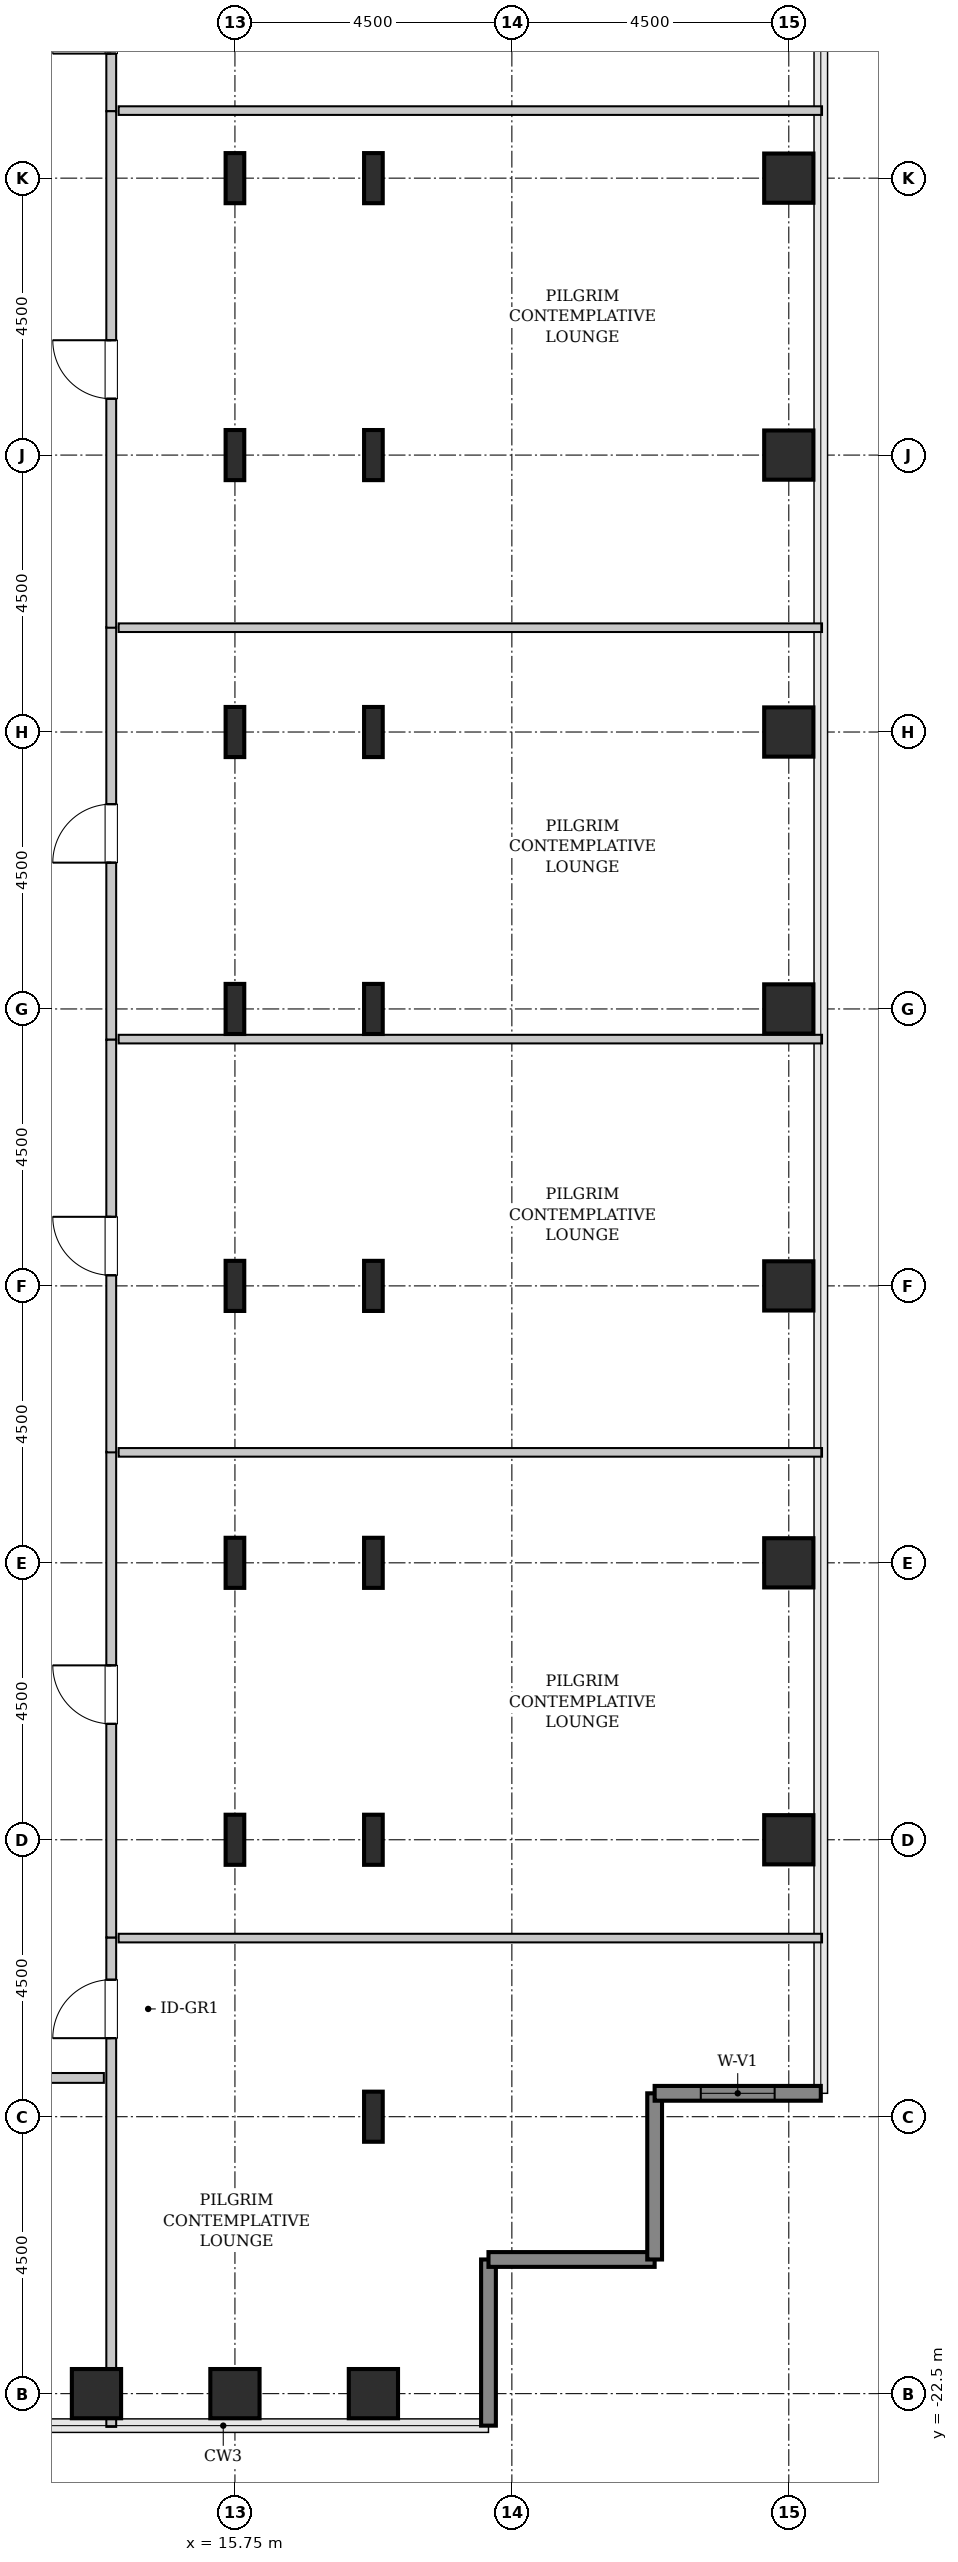
"""IFC4 building model, lengths in metres.
Left out: names, types, materials, properties, quantities, classifications, styles, units other than length and angle.
Written with IfcOpenShell. Run it as: python <this file> out.ifc"""

import sys

from ifc_helpers import new_model, si_unit, direction, frame, frame_2d, origin, origin_2d, place, context, subcontext, project, spatial, rectangle, hollow_rectangle, i_section, extrude, source, transform, mapped, element, fill, save


model = new_model("IFC4")
c1 = context("Model", 3, precision=1e-05, world=origin(), true_north=direction((0.0, 1.0)))
c2 = subcontext(c1, "Body", "Model", "MODEL_VIEW")
j1 = project(units=[si_unit("LENGTHUNIT", "METRE"), si_unit("PLANEANGLEUNIT", "RADIAN")], contexts=[c1])
p1 = place(None, origin())
s1 = spatial("IfcSite", under=j1, at=p1, CompositionType="ELEMENT")
p2 = place(p1, origin())
s2 = spatial("IfcBuilding", under=s1, at=p2, CompositionType="ELEMENT")
p3 = place(p2, frame((0.0, 0.0, 164.0)))
s3 = spatial("IfcBuildingStorey", under=s2, at=p3, CompositionType="ELEMENT", Elevation=164.0)
m1 = source(origin(), c2, "Body", "SweptSolid", [
    extrude(hollow_rectangle(XDim=0.8, YDim=0.8, WallThickness=0.04, InnerFilletRadius=0.04, OuterFilletRadius=0.08, at=origin_2d()), origin(), (0.0, 0.0, 1.0), 3.8),
])
for number, where, z_axis, x_axis in (
    (1, (13.5, -22.5, 0.0), (0.0, 0.0, 1.0), (1.0, 0.0, 0.0)),
    (2, (15.75, -22.5, 0.0), (0.0, 0.0, 1.0), (1.0, 0.0, 0.0)),
):
    element("IfcColumn", number, at=place(p3, frame(where, z_axis=z_axis, x_axis=x_axis)), inside=s3, PredefinedType="COLUMN", context=c2, shape_type="MappedRepresentation", body=[
        mapped(m1, transform((0.0, 0.0, 0.0), x_axis=(1.0, 0.0, 0.0), y_axis=(0.0, 1.0, 0.0), z_axis=(0.0, 0.0, 1.0), scale=1.0)),
    ])
m2 = source(origin(), c2, "Body", "SweptSolid", [
    extrude(i_section(OverallWidth=0.303, OverallDepth=0.814, WebThickness=0.021, FlangeThickness=0.04, FilletRadius=0.03, at=origin_2d()), origin(), (0.0, 0.0, 1.0), 3.8),
])
for number, where, z_axis, x_axis in (
    (3, (15.75, -13.5, 0.0), (0.0, 0.0, 1.0), (1.0, 0.0, 0.0)),
    (4, (15.75, -9.0, 0.0), (0.0, 0.0, 1.0), (1.0, 0.0, 0.0)),
    (5, (15.75, -4.5, 0.0), (0.0, 0.0, 1.0), (1.0, 0.0, 0.0)),
    (6, (15.75, 0.0, 0.0), (0.0, 0.0, 1.0), (1.0, 0.0, 0.0)),
    (7, (15.75, 4.5, 0.0), (0.0, 0.0, 1.0), (1.0, 0.0, 0.0)),
    (8, (15.75, 9.0, 0.0), (0.0, 0.0, 1.0), (1.0, 0.0, 0.0)),
    (9, (15.75, 13.5, 0.0), (0.0, 0.0, 1.0), (1.0, 0.0, 0.0)),
):
    element("IfcColumn", number, at=place(p3, frame(where, z_axis=z_axis, x_axis=x_axis)), inside=s3, PredefinedType="COLUMN", context=c2, shape_type="MappedRepresentation", body=[
        mapped(m2, transform((0.0, 0.0, 0.0), x_axis=(1.0, 0.0, 0.0), y_axis=(0.0, 1.0, 0.0), z_axis=(0.0, 0.0, 1.0), scale=1.0)),
    ])
p4 = place(p3, frame((18.0, -22.5, 0.0), z_axis=(0.0, 0.0, 1.0), x_axis=(1.0, 0.0, 0.0)))
e10 = element("IfcColumn", 10, at=p4, inside=s3, PredefinedType="COLUMN", context=c2, shape_type="MappedRepresentation", body=[
    mapped(m1, transform((0.0, 0.0, 0.0), x_axis=(1.0, 0.0, 0.0), y_axis=(0.0, 1.0, 0.0), z_axis=(0.0, 0.0, 1.0), scale=1.0)),
])
for number, where, z_axis, x_axis in (
    (11, (18.0, -18.0, 0.0), (0.0, 0.0, 1.0), (1.0, 0.0, 0.0)),
    (12, (18.0, -13.5, 0.0), (0.0, 0.0, 1.0), (1.0, 0.0, 0.0)),
    (13, (18.0, -9.0, 0.0), (0.0, 0.0, 1.0), (1.0, 0.0, 0.0)),
    (14, (18.0, -4.5, 0.0), (0.0, 0.0, 1.0), (1.0, 0.0, 0.0)),
    (15, (18.0, 0.0, 0.0), (0.0, 0.0, 1.0), (1.0, 0.0, 0.0)),
    (16, (18.0, 4.5, 0.0), (0.0, 0.0, 1.0), (1.0, 0.0, 0.0)),
    (17, (18.0, 9.0, 0.0), (0.0, 0.0, 1.0), (1.0, 0.0, 0.0)),
    (18, (18.0, 13.5, 0.0), (0.0, 0.0, 1.0), (1.0, 0.0, 0.0)),
):
    element("IfcColumn", number, at=place(p3, frame(where, z_axis=z_axis, x_axis=x_axis)), inside=s3, PredefinedType="COLUMN", context=c2, shape_type="MappedRepresentation", body=[
        mapped(m2, transform((0.0, 0.0, 0.0), x_axis=(1.0, 0.0, 0.0), y_axis=(0.0, 1.0, 0.0), z_axis=(0.0, 0.0, 1.0), scale=1.0)),
    ])
for number, where, z_axis, x_axis in (
    (19, (24.75, -13.5, 0.0), (0.0, 0.0, 1.0), (1.0, 0.0, 0.0)),
    (20, (24.75, -9.0, 0.0), (0.0, 0.0, 1.0), (1.0, 0.0, 0.0)),
    (21, (24.75, -4.5, 0.0), (0.0, 0.0, 1.0), (1.0, 0.0, 0.0)),
    (22, (24.75, 0.0, 0.0), (0.0, 0.0, 1.0), (1.0, 0.0, 0.0)),
    (23, (24.75, 4.5, 0.0), (0.0, 0.0, 1.0), (1.0, 0.0, 0.0)),
    (24, (24.75, 9.0, 0.0), (0.0, 0.0, 1.0), (1.0, 0.0, 0.0)),
    (25, (24.75, 13.5, 0.0), (0.0, 0.0, 1.0), (1.0, 0.0, 0.0)),
):
    element("IfcColumn", number, at=place(p3, frame(where, z_axis=z_axis, x_axis=x_axis)), inside=s3, PredefinedType="COLUMN", context=c2, shape_type="MappedRepresentation", body=[
        mapped(m1, transform((0.0, 0.0, 0.0), x_axis=(1.0, 0.0, 0.0), y_axis=(0.0, 1.0, 0.0), z_axis=(0.0, 0.0, 1.0), scale=1.0)),
    ])
m3 = source(origin(), c2, "Body", "SweptSolid", [
    extrude(rectangle(XDim=2.7, YDim=0.24, at=frame_2d((1.35, 0.0))), origin(), (0.0, 0.0, 1.0), 3.55),
])
for number, where, z_axis, x_axis in (
    (26, (19.87, -23.02, 0.0), (0.0, 0.0, 1.0), (0.0, 1.0, 0.0)),
    (27, (19.87, -20.32, 0.0), (0.0, 0.0, 1.0), (1.0, 0.0, 0.0)),
    (28, (22.57, -20.32, 0.0), (0.0, 0.0, 1.0), (0.0, 1.0, 0.0)),
):
    element("IfcWall", number, at=place(p3, frame(where, z_axis=z_axis, x_axis=x_axis)), inside=s3, PredefinedType="SHEAR", context=c2, shape_type="MappedRepresentation", body=[
        mapped(m3, transform((0.0, 0.0, 0.0), x_axis=(1.0, 0.0, 0.0), y_axis=(0.0, 1.0, 0.0), z_axis=(0.0, 0.0, 1.0), scale=1.0)),
    ])
p5 = place(p3, frame((22.57, -17.62, 0.0), z_axis=(0.0, 0.0, 1.0), x_axis=(1.0, 0.0, 0.0)))
e29 = element("IfcWall", 29, at=p5, inside=s3, PredefinedType="SHEAR", context=c2, shape_type="MappedRepresentation", body=[
    mapped(m3, transform((0.0, 0.0, 0.0), x_axis=(1.0, 0.0, 0.0), y_axis=(0.0, 1.0, 0.0), z_axis=(0.0, 0.0, 1.0), scale=1.0)),
])
p6 = place(p5, frame((0.75, 0.0, 0.85)))
e30 = element("IfcOpeningElement", 30, at=p6, cuts=e29, PredefinedType="OPENING", context=c2, shape_type="SweptSolid", body=[
    extrude(rectangle(XDim=1.2, YDim=1.8, at=frame_2d((0.6, 0.9))), frame((0.0, 0.13, 0.0), z_axis=(0.0, -1.0, 0.0), x_axis=(1.0, 0.0, 0.0)), (0.0, 0.0, 1.0), 0.26),
])
m4 = source(origin(), c2, "Body", "SweptSolid", [
    extrude(rectangle(XDim=7.953, YDim=0.16, at=frame_2d((3.976, 0.0))), origin(), (0.0, 0.0, 1.0), 3.535),
])
p7 = place(p3, frame((13.74, -23.04, 0.0), z_axis=(0.0, 0.0, 1.0), x_axis=(0.0, 1.0, 0.0)))
e31 = element("IfcWall", 31, at=p7, inside=s3, PredefinedType="PARTITIONING", context=c2, shape_type="MappedRepresentation", body=[
    mapped(m4, transform((0.0, 0.0, 0.0), x_axis=(1.0, 0.0, 0.0), y_axis=(0.0, 1.0, 0.0), z_axis=(0.0, 0.0, 1.0), scale=1.0)),
])
p8 = place(p7, frame((6.316, 0.0, 0.0)))
e32 = element("IfcOpeningElement", 32, at=p8, cuts=e31, PredefinedType="OPENING", context=c2, shape_type="SweptSolid", body=[
    extrude(rectangle(XDim=0.95, YDim=2.1, at=frame_2d((0.475, 1.05))), frame((0.0, 0.09, 0.0), z_axis=(0.0, -1.0, 0.0), x_axis=(1.0, 0.0, 0.0)), (0.0, 0.0, 1.0), 0.18),
])
m5 = source(origin(), c2, "Body", "SweptSolid", [
    extrude(rectangle(XDim=11.43, YDim=0.14, at=frame_2d((5.715, 0.0))), origin(), (0.0, 0.0, 1.0), 3.535),
])
p9 = place(p3, frame((13.86, -15.097, 0.0), z_axis=(0.0, 0.0, 1.0), x_axis=(1.0, 0.0, 0.0)))
e33 = element("IfcWall", 33, at=p9, inside=s3, PredefinedType="PARTITIONING", context=c2, shape_type="MappedRepresentation", body=[
    mapped(m5, transform((0.0, 0.0, 0.0), x_axis=(1.0, 0.0, 0.0), y_axis=(0.0, 1.0, 0.0), z_axis=(0.0, 0.0, 1.0), scale=1.0)),
])
m6 = source(origin(), c2, "Body", "SweptSolid", [
    extrude(rectangle(XDim=7.892, YDim=0.16, at=frame_2d((3.946, 0.0))), origin(), (0.0, 0.0, 1.0), 3.535),
])
p10 = place(p3, frame((13.74, -15.087, 0.0), z_axis=(0.0, 0.0, 1.0), x_axis=(0.0, 1.0, 0.0)))
e34 = element("IfcWall", 34, at=p10, inside=s3, PredefinedType="PARTITIONING", context=c2, shape_type="MappedRepresentation", body=[
    mapped(m6, transform((0.0, 0.0, 0.0), x_axis=(1.0, 0.0, 0.0), y_axis=(0.0, 1.0, 0.0), z_axis=(0.0, 0.0, 1.0), scale=1.0)),
])
p11 = place(p10, frame((3.471, 0.0, 0.0)))
e35 = element("IfcOpeningElement", 35, at=p11, cuts=e34, PredefinedType="OPENING", context=c2, shape_type="SweptSolid", body=[
    extrude(rectangle(XDim=0.95, YDim=2.1, at=frame_2d((0.475, 1.05))), frame((0.0, 0.09, 0.0), z_axis=(0.0, -1.0, 0.0), x_axis=(1.0, 0.0, 0.0)), (0.0, 0.0, 1.0), 0.18),
])
p12 = place(p3, frame((13.86, -7.205, 0.0), z_axis=(0.0, 0.0, 1.0), x_axis=(1.0, 0.0, 0.0)))
e36 = element("IfcWall", 36, at=p12, inside=s3, PredefinedType="PARTITIONING", context=c2, shape_type="MappedRepresentation", body=[
    mapped(m5, transform((0.0, 0.0, 0.0), x_axis=(1.0, 0.0, 0.0), y_axis=(0.0, 1.0, 0.0), z_axis=(0.0, 0.0, 1.0), scale=1.0)),
])
m7 = source(origin(), c2, "Body", "SweptSolid", [
    extrude(rectangle(XDim=6.705, YDim=0.16, at=frame_2d((3.353, 0.0))), origin(), (0.0, 0.0, 1.0), 3.535),
])
p13 = place(p3, frame((13.74, -0.5, 0.0), z_axis=(0.0, 0.0, 1.0), x_axis=(0.0, 1.0, 0.0)))
e37 = element("IfcWall", 37, at=p13, inside=s3, PredefinedType="PARTITIONING", context=c2, shape_type="MappedRepresentation", body=[
    mapped(m7, transform((0.0, 0.0, 0.0), x_axis=(1.0, 0.0, 0.0), y_axis=(0.0, 1.0, 0.0), z_axis=(0.0, 0.0, 1.0), scale=1.0)),
])
p14 = place(p13, frame((2.877, 0.0, 0.0)))
e38 = element("IfcOpeningElement", 38, at=p14, cuts=e37, PredefinedType="OPENING", context=c2, shape_type="SweptSolid", body=[
    extrude(rectangle(XDim=0.95, YDim=2.1, at=frame_2d((0.475, 1.05))), frame((0.0, 0.09, 0.0), z_axis=(0.0, -1.0, 0.0), x_axis=(1.0, 0.0, 0.0)), (0.0, 0.0, 1.0), 0.18),
])
p15 = place(p3, frame((13.86, 6.195, 0.0), z_axis=(0.0, 0.0, 1.0), x_axis=(1.0, 0.0, 0.0)))
e39 = element("IfcWall", 39, at=p15, inside=s3, PredefinedType="PARTITIONING", context=c2, shape_type="MappedRepresentation", body=[
    mapped(m5, transform((0.0, 0.0, 0.0), x_axis=(1.0, 0.0, 0.0), y_axis=(0.0, 1.0, 0.0), z_axis=(0.0, 0.0, 1.0), scale=1.0)),
])
m8 = source(origin(), c2, "Body", "SweptSolid", [
    extrude(rectangle(XDim=11.43, YDim=0.14, at=frame_2d((5.715, 0.0))), origin(), (0.0, 0.0, 1.0), 2.875),
])
p16 = place(p3, frame((13.86, -0.49, 0.0), z_axis=(0.0, 0.0, 1.0), x_axis=(1.0, 0.0, 0.0)))
e40 = element("IfcWall", 40, at=p16, inside=s3, PredefinedType="PARTITIONING", context=c2, shape_type="MappedRepresentation", body=[
    mapped(m8, transform((0.0, 0.0, 0.0), x_axis=(1.0, 0.0, 0.0), y_axis=(0.0, 1.0, 0.0), z_axis=(0.0, 0.0, 1.0), scale=1.0)),
])
p17 = place(p3, frame((13.74, -7.205, 0.0), z_axis=(0.0, 0.0, 1.0), x_axis=(0.0, 1.0, 0.0)))
e41 = element("IfcWall", 41, at=p17, inside=s3, PredefinedType="PARTITIONING", context=c2, shape_type="MappedRepresentation", body=[
    mapped(m7, transform((0.0, 0.0, 0.0), x_axis=(1.0, 0.0, 0.0), y_axis=(0.0, 1.0, 0.0), z_axis=(0.0, 0.0, 1.0), scale=1.0)),
])
p18 = place(p17, frame((2.877, 0.0, 0.0)))
e42 = element("IfcOpeningElement", 42, at=p18, cuts=e41, PredefinedType="OPENING", context=c2, shape_type="SweptSolid", body=[
    extrude(rectangle(XDim=0.95, YDim=2.1, at=frame_2d((0.475, 1.05))), frame((0.0, 0.09, 0.0), z_axis=(0.0, -1.0, 0.0), x_axis=(1.0, 0.0, 0.0)), (0.0, 0.0, 1.0), 0.18),
])
m9 = source(origin(), c2, "Body", "SweptSolid", [
    extrude(rectangle(XDim=8.453, YDim=0.16, at=frame_2d((4.226, 0.0))), origin(), (0.0, 0.0, 1.0), 3.535),
])
p19 = place(p3, frame((13.74, 14.587, 0.0), z_axis=(0.0, 0.0, 1.0), x_axis=(0.0, 1.0, 0.0)))
e43 = element("IfcWall", 43, at=p19, inside=s3, PredefinedType="PARTITIONING", context=c2, shape_type="MappedRepresentation", body=[
    mapped(m9, transform((0.0, 0.0, 0.0), x_axis=(1.0, 0.0, 0.0), y_axis=(0.0, 1.0, 0.0), z_axis=(0.0, 0.0, 1.0), scale=1.0)),
])
p20 = place(p19, frame((0.936, 0.0, 0.0)))
e44 = element("IfcOpeningElement", 44, at=p20, cuts=e43, PredefinedType="OPENING", context=c2, shape_type="SweptSolid", body=[
    extrude(rectangle(XDim=0.95, YDim=2.1, at=frame_2d((0.475, 1.05))), frame((0.0, 0.09, 0.0), z_axis=(0.0, -1.0, 0.0), x_axis=(1.0, 0.0, 0.0)), (0.0, 0.0, 1.0), 0.18),
])
p21 = place(p3, frame((13.86, 14.597, 0.0), z_axis=(0.0, 0.0, 1.0), x_axis=(1.0, 0.0, 0.0)))
e45 = element("IfcWall", 45, at=p21, inside=s3, PredefinedType="PARTITIONING", context=c2, shape_type="MappedRepresentation", body=[
    mapped(m5, transform((0.0, 0.0, 0.0), x_axis=(1.0, 0.0, 0.0), y_axis=(0.0, 1.0, 0.0), z_axis=(0.0, 0.0, 1.0), scale=1.0)),
])
m10 = source(origin(), c2, "Body", "SweptSolid", [
    extrude(rectangle(XDim=8.392, YDim=0.16, at=frame_2d((4.196, 0.0))), origin(), (0.0, 0.0, 1.0), 3.535),
])
p22 = place(p3, frame((13.74, 6.195, 0.0), z_axis=(0.0, 0.0, 1.0), x_axis=(0.0, 1.0, 0.0)))
e46 = element("IfcWall", 46, at=p22, inside=s3, PredefinedType="PARTITIONING", context=c2, shape_type="MappedRepresentation", body=[
    mapped(m10, transform((0.0, 0.0, 0.0), x_axis=(1.0, 0.0, 0.0), y_axis=(0.0, 1.0, 0.0), z_axis=(0.0, 0.0, 1.0), scale=1.0)),
])
p23 = place(p22, frame((3.721, 0.0, 0.0)))
e47 = element("IfcOpeningElement", 47, at=p23, cuts=e46, PredefinedType="OPENING", context=c2, shape_type="SweptSolid", body=[
    extrude(rectangle(XDim=0.95, YDim=2.1, at=frame_2d((0.475, 1.05))), frame((0.0, 0.09, 0.0), z_axis=(0.0, -1.0, 0.0), x_axis=(1.0, 0.0, 0.0)), (0.0, 0.0, 1.0), 0.18),
])
m11 = source(origin(), c2, "Body", "SweptSolid", [
    extrude(rectangle(XDim=6.025, YDim=0.16, at=frame_2d((3.013, 0.0))), origin(), (0.0, 0.0, 1.0), 3.535),
])
p24 = place(p3, frame((7.595, -17.37, 0.0), z_axis=(0.0, 0.0, 1.0), x_axis=(1.0, 0.0, 0.0)))
e48 = element("IfcWall", 48, at=p24, inside=s3, PredefinedType="PARTITIONING", context=c2, shape_type="MappedRepresentation", body=[
    mapped(m11, transform((0.0, 0.0, 0.0), x_axis=(1.0, 0.0, 0.0), y_axis=(0.0, 1.0, 0.0), z_axis=(0.0, 0.0, 1.0), scale=1.0)),
])
p25 = place(p24, frame((2.176, 0.0, 0.0)))
e49 = element("IfcOpeningElement", 49, at=p25, cuts=e48, PredefinedType="OPENING", context=c2, shape_type="SweptSolid", body=[
    extrude(rectangle(XDim=0.95, YDim=2.1, at=frame_2d((0.475, 1.05))), frame((0.0, 0.09, 0.0), z_axis=(0.0, -1.0, 0.0), x_axis=(1.0, 0.0, 0.0)), (0.0, 0.0, 1.0), 0.18),
])
m12 = source(origin(), c2, "Body", "SweptSolid", [
    extrude(rectangle(XDim=1.2, YDim=1.8, at=frame_2d((0.6, 0.9))), frame((0.0, 0.03, 0.0), z_axis=(0.0, -1.0, 0.0), x_axis=(1.0, 0.0, 0.0)), (0.0, 0.0, 1.0), 0.06),
])
p26 = place(p6, origin())
e50 = element("IfcWindow", 50, at=p26, inside=s3, PartitioningType="SINGLE_PANEL", PredefinedType="WINDOW", context=c2, shape_type="MappedRepresentation", body=[
    mapped(m12, transform((0.0, 0.0, 0.0), x_axis=(1.0, 0.0, 0.0), y_axis=(0.0, 1.0, 0.0), z_axis=(0.0, 0.0, 1.0), scale=1.0)),
])
fill(e30, e50)
m13 = source(origin(), c2, "Body", "SweptSolid", [
    extrude(rectangle(XDim=0.95, YDim=2.1, at=frame_2d((0.475, 1.05))), frame((0.0, 0.025, 0.0), z_axis=(0.0, -1.0, 0.0), x_axis=(1.0, 0.0, 0.0)), (0.0, 0.0, 1.0), 0.05),
])
p27 = place(p8, origin())
e51 = element("IfcDoor", 51, at=p27, inside=s3, OperationType="SINGLE_SWING_LEFT", PredefinedType="DOOR", context=c2, shape_type="MappedRepresentation", body=[
    mapped(m13, transform((0.0, 0.0, 0.0), x_axis=(1.0, 0.0, 0.0), y_axis=(0.0, 1.0, 0.0), z_axis=(0.0, 0.0, 1.0), scale=1.0)),
])
fill(e32, e51)
p28 = place(p11, origin())
e52 = element("IfcDoor", 52, at=p28, inside=s3, OperationType="SINGLE_SWING_RIGHT", PredefinedType="DOOR", context=c2, shape_type="MappedRepresentation", body=[
    mapped(m13, transform((0.0, 0.0, 0.0), x_axis=(1.0, 0.0, 0.0), y_axis=(0.0, 1.0, 0.0), z_axis=(0.0, 0.0, 1.0), scale=1.0)),
])
fill(e35, e52)
p29 = place(p14, origin())
e53 = element("IfcDoor", 53, at=p29, inside=s3, OperationType="SINGLE_SWING_LEFT", PredefinedType="DOOR", context=c2, shape_type="MappedRepresentation", body=[
    mapped(m13, transform((0.0, 0.0, 0.0), x_axis=(1.0, 0.0, 0.0), y_axis=(0.0, 1.0, 0.0), z_axis=(0.0, 0.0, 1.0), scale=1.0)),
])
fill(e38, e53)
p30 = place(p18, origin())
e54 = element("IfcDoor", 54, at=p30, inside=s3, OperationType="SINGLE_SWING_RIGHT", PredefinedType="DOOR", context=c2, shape_type="MappedRepresentation", body=[
    mapped(m13, transform((0.0, 0.0, 0.0), x_axis=(1.0, 0.0, 0.0), y_axis=(0.0, 1.0, 0.0), z_axis=(0.0, 0.0, 1.0), scale=1.0)),
])
fill(e42, e54)
p31 = place(p20, origin())
e55 = element("IfcDoor", 55, at=p31, inside=s3, OperationType="SINGLE_SWING_LEFT", PredefinedType="DOOR", context=c2, shape_type="MappedRepresentation", body=[
    mapped(m13, transform((0.0, 0.0, 0.0), x_axis=(1.0, 0.0, 0.0), y_axis=(0.0, 1.0, 0.0), z_axis=(0.0, 0.0, 1.0), scale=1.0)),
])
fill(e44, e55)
p32 = place(p23, origin())
e56 = element("IfcDoor", 56, at=p32, inside=s3, OperationType="SINGLE_SWING_RIGHT", PredefinedType="DOOR", context=c2, shape_type="MappedRepresentation", body=[
    mapped(m13, transform((0.0, 0.0, 0.0), x_axis=(1.0, 0.0, 0.0), y_axis=(0.0, 1.0, 0.0), z_axis=(0.0, 0.0, 1.0), scale=1.0)),
])
fill(e47, e56)
save(model, sys.argv[1])
